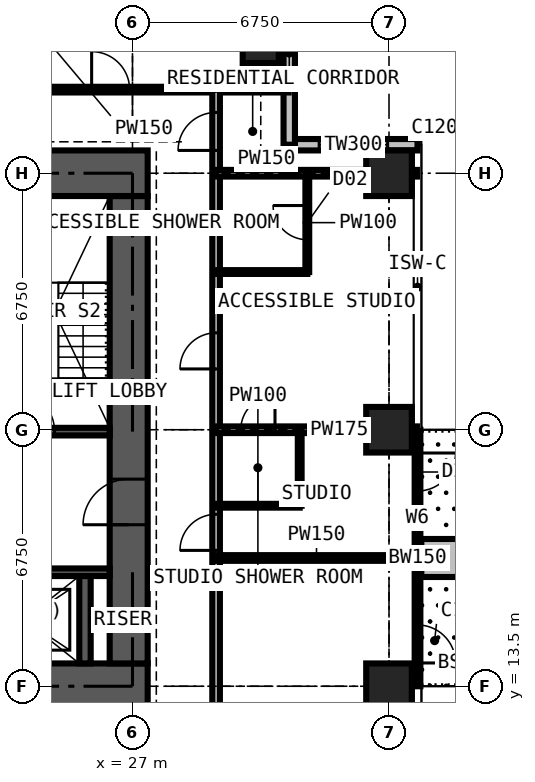
"""IFC4 building model, lengths in metres.
Left out: names, types, materials, properties, quantities, classifications, styles, units other than length and angle.
Written with IfcOpenShell. Run it as: python <this file> out.ifc"""

import sys

from ifc_helpers import new_model, si_unit, direction, frame, frame_2d, origin, origin_2d, place, context, subcontext, project, spatial, rectangle, extrude, element, fill, save


model = new_model("IFC4")
c1 = context("Model", 3, precision=1e-05, world=origin(), true_north=direction((0.0, 1.0)))
c2 = subcontext(c1, "Body", "Model", "MODEL_VIEW")
j1 = project(units=[si_unit("LENGTHUNIT", "METRE"), si_unit("PLANEANGLEUNIT", "RADIAN")], contexts=[c1])
p1 = place(None, origin())
s1 = spatial("IfcSite", under=j1, at=p1, CompositionType="ELEMENT")
p2 = place(p1, origin())
s2 = spatial("IfcBuilding", under=s1, at=p2, CompositionType="ELEMENT")
p3 = place(p2, frame((0.0, 0.0, 185.4)))
s3 = spatial("IfcBuildingStorey", under=s2, at=p3, CompositionType="ELEMENT", Elevation=185.4)
p4 = place(p3, frame((30.375, 30.375, 0.0), z_axis=(0.0, 0.0, 1.0), x_axis=(1.0, 0.0, 0.0)))
e1 = element("IfcColumn", 1, at=p4, inside=s3, PredefinedType="COLUMN", context=c2, shape_type="SweptSolid", body=[
    extrude(rectangle(XDim=0.95, YDim=0.95, at=origin_2d()), origin(), (0.0, 0.0, 1.0), 3.6),
])
for number, where, z_axis, x_axis in (
    (2, (33.75, 13.5, 0.0), (0.0, 0.0, 1.0), (1.0, 0.0, 0.0)),
    (3, (33.75, 20.25, 0.0), (0.0, 0.0, 1.0), (1.0, 0.0, 0.0)),
    (4, (33.75, 27.0, 0.0), (0.0, 0.0, 1.0), (1.0, 0.0, 0.0)),
):
    element("IfcColumn", number, at=place(p3, frame(where, z_axis=z_axis, x_axis=x_axis)), inside=s3, PredefinedType="COLUMN", context=c2, shape_type="SweptSolid", body=[
        extrude(rectangle(XDim=1.2, YDim=1.2, at=origin_2d()), origin(), (0.0, 0.0, 1.0), 3.6),
    ])
p5 = place(p3, frame((13.1, 13.5, 0.0), z_axis=(0.0, 0.0, 1.0), x_axis=(1.0, 0.0, 0.0)))
e5 = element("IfcWall", 5, at=p5, inside=s3, PredefinedType="SHEAR", context=c2, shape_type="SweptSolid", body=[
    extrude(rectangle(XDim=14.3, YDim=1.2, at=frame_2d((7.15, 0.0))), origin(), (0.0, 0.0, 1.0), 3.6),
])
p6 = place(p3, frame((26.9, 14.1, 0.0), z_axis=(0.0, 0.0, 1.0), x_axis=(0.0, 1.0, 0.0)))
e6 = element("IfcWall", 6, at=p6, inside=s3, PredefinedType="SHEAR", context=c2, shape_type="SweptSolid", body=[
    extrude(rectangle(XDim=12.3, YDim=1.0, at=frame_2d((6.15, 0.0))), origin(), (0.0, 0.0, 1.0), 3.6),
])
p7 = place(p6, frame((3.65, 0.0, 0.0)))
e7 = element("IfcOpeningElement", 7, at=p7, cuts=e6, PredefinedType="OPENING", context=c2, shape_type="SweptSolid", body=[
    extrude(rectangle(XDim=1.2, YDim=2.2, at=frame_2d((0.6, 1.1))), frame((0.0, 0.51, 0.0), z_axis=(0.0, -1.0, 0.0), x_axis=(1.0, 0.0, 0.0)), (0.0, 0.0, 1.0), 1.02),
])
p8 = place(p3, frame((27.4, 27.0, 0.0), z_axis=(0.0, 0.0, 1.0), x_axis=(-1.0, 0.0, 0.0)))
e8 = element("IfcWall", 8, at=p8, inside=s3, PredefinedType="SHEAR", context=c2, shape_type="SweptSolid", body=[
    extrude(rectangle(XDim=14.3, YDim=1.2, at=frame_2d((7.15, 0.0))), origin(), (0.0, 0.0, 1.0), 3.6),
])
p9 = place(p8, frame((4.55, 0.0, 0.0)))
e9 = element("IfcOpeningElement", 9, at=p9, cuts=e8, PredefinedType="OPENING", context=c2, shape_type="SweptSolid", body=[
    extrude(rectangle(XDim=0.9, YDim=2.2, at=frame_2d((0.45, 1.1))), frame((0.0, 0.61, 0.0), z_axis=(0.0, -1.0, 0.0), x_axis=(1.0, 0.0, 0.0)), (0.0, 0.0, 1.0), 1.22),
])
p10 = place(p8, frame((7.525, 0.0, 0.0)))
e10 = element("IfcOpeningElement", 10, at=p10, cuts=e8, PredefinedType="OPENING", context=c2, shape_type="SweptSolid", body=[
    extrude(rectangle(XDim=1.0, YDim=2.2, at=frame_2d((0.5, 1.1))), frame((0.0, 0.61, 0.0), z_axis=(0.0, -1.0, 0.0), x_axis=(1.0, 0.0, 0.0)), (0.0, 0.0, 1.0), 1.22),
])
p11 = place(p3, frame((34.5, 20.25, 0.0), z_axis=(0.0, 0.0, 1.0), x_axis=(0.0, -1.0, 0.0)))
e11 = element("IfcWall", 11, at=p11, inside=s3, PredefinedType="SOLIDWALL", context=c2, shape_type="SweptSolid", body=[
    extrude(rectangle(XDim=6.75, YDim=0.15, at=frame_2d((3.375, 0.0))), origin(), (0.0, 0.0, 1.0), 3.375),
])
p12 = place(p11, frame((0.613, 0.0, 0.0)))
e12 = element("IfcOpeningElement", 12, at=p12, cuts=e11, PredefinedType="OPENING", context=c2, shape_type="SweptSolid", body=[
    extrude(rectangle(XDim=1.0, YDim=2.2, at=frame_2d((0.5, 1.1))), frame((0.0, 0.085, 0.0), z_axis=(0.0, -1.0, 0.0), x_axis=(1.0, 0.0, 0.0)), (0.0, 0.0, 1.0), 0.17),
])
p13 = place(p11, frame((1.725, 0.0, 0.9)))
e13 = element("IfcOpeningElement", 13, at=p13, cuts=e11, PredefinedType="OPENING", context=c2, shape_type="SweptSolid", body=[
    extrude(rectangle(XDim=1.2, YDim=1.8, at=frame_2d((0.6, 0.9))), frame((0.0, 0.085, 0.0), z_axis=(0.0, -1.0, 0.0), x_axis=(1.0, 0.0, 0.0)), (0.0, 0.0, 1.0), 0.17),
])
p14 = place(p11, frame((5.137, 0.0, 0.0)))
e14 = element("IfcOpeningElement", 14, at=p14, cuts=e11, PredefinedType="OPENING", context=c2, shape_type="SweptSolid", body=[
    extrude(rectangle(XDim=1.0, YDim=2.2, at=frame_2d((0.5, 1.1))), frame((0.0, 0.085, 0.0), z_axis=(0.0, -1.0, 0.0), x_axis=(1.0, 0.0, 0.0)), (0.0, 0.0, 1.0), 0.17),
])
p15 = place(p11, frame((3.825, 0.0, 0.9)))
e15 = element("IfcOpeningElement", 15, at=p15, cuts=e11, PredefinedType="OPENING", context=c2, shape_type="SweptSolid", body=[
    extrude(rectangle(XDim=1.2, YDim=1.8, at=frame_2d((0.6, 0.9))), frame((0.0, 0.085, 0.0), z_axis=(0.0, -1.0, 0.0), x_axis=(1.0, 0.0, 0.0)), (0.0, 0.0, 1.0), 0.17),
])
p16 = place(p3, frame((34.5, 27.75, 0.0), z_axis=(0.0, 0.0, 1.0), x_axis=(-1.0, 0.0, 0.0)))
e16 = element("IfcWall", 16, at=p16, inside=s3, PredefinedType="SOLIDWALL", context=c2, shape_type="SweptSolid", body=[
    extrude(rectangle(XDim=3.375, YDim=0.3, at=frame_2d((1.688, 0.0))), origin(), (0.0, 0.0, 1.0), 3.375),
])
p17 = place(p16, frame((0.788, 0.0, 0.6)))
e17 = element("IfcOpeningElement", 17, at=p17, cuts=e16, PredefinedType="OPENING", context=c2, shape_type="SweptSolid", body=[
    extrude(rectangle(XDim=1.8, YDim=2.1, at=frame_2d((0.9, 1.05))), frame((0.0, 0.16, 0.0), z_axis=(0.0, -1.0, 0.0), x_axis=(1.0, 0.0, 0.0)), (0.0, 0.0, 1.0), 0.32),
])
p18 = place(p3, frame((31.125, 27.75, 0.0), z_axis=(0.0, 0.0, 1.0), x_axis=(0.0, 1.0, 0.0)))
e18 = element("IfcWall", 18, at=p18, inside=s3, PredefinedType="SOLIDWALL", context=c2, shape_type="SweptSolid", body=[
    extrude(rectangle(XDim=3.375, YDim=0.3, at=frame_2d((1.688, 0.0))), origin(), (0.0, 0.0, 1.0), 3.375),
])
p19 = place(p18, frame((1.663, 0.0, 0.9)))
e19 = element("IfcOpeningElement", 19, at=p19, cuts=e18, PredefinedType="OPENING", context=c2, shape_type="SweptSolid", body=[
    extrude(rectangle(XDim=1.5, YDim=1.8, at=frame_2d((0.75, 0.9))), frame((0.0, 0.16, 0.0), z_axis=(0.0, -1.0, 0.0), x_axis=(1.0, 0.0, 0.0)), (0.0, 0.0, 1.0), 0.32),
])
p20 = place(p3, frame((34.6, 16.875, 0.0), z_axis=(0.0, 0.0, 1.0), x_axis=(1.0, 0.0, 0.0)))
e20 = element("IfcWall", 20, at=p20, inside=s3, PredefinedType="USERDEFINED", context=c2, shape_type="SweptSolid", body=[
    extrude(rectangle(XDim=2.2, YDim=1.0, at=frame_2d((1.1, 0.0))), origin(), (0.0, 0.0, 1.0), 0.9),
])
p21 = place(p3, frame((14.1, 16.5, 0.0), z_axis=(0.0, 0.0, 1.0), x_axis=(1.0, 0.0, 0.0)))
e21 = element("IfcWall", 21, at=p21, inside=s3, PredefinedType="SHEAR", context=c2, shape_type="SweptSolid", body=[
    extrude(rectangle(XDim=12.3, YDim=0.2, at=frame_2d((6.15, 0.0))), origin(), (0.0, 0.0, 1.0), 3.6),
])
p22 = place(p21, frame((0.9, 0.0, 0.0)))
e22 = element("IfcOpeningElement", 22, at=p22, cuts=e21, PredefinedType="OPENING", context=c2, shape_type="SweptSolid", body=[
    extrude(rectangle(XDim=1.1, YDim=2.2, at=frame_2d((0.55, 1.1))), frame((0.0, 0.11, 0.0), z_axis=(0.0, -1.0, 0.0), x_axis=(1.0, 0.0, 0.0)), (0.0, 0.0, 1.0), 0.22),
])
p23 = place(p21, frame((4.31, 0.0, 0.0)))
e23 = element("IfcOpeningElement", 23, at=p23, cuts=e21, PredefinedType="OPENING", context=c2, shape_type="SweptSolid", body=[
    extrude(rectangle(XDim=1.1, YDim=2.2, at=frame_2d((0.55, 1.1))), frame((0.0, 0.11, 0.0), z_axis=(0.0, -1.0, 0.0), x_axis=(1.0, 0.0, 0.0)), (0.0, 0.0, 1.0), 0.22),
])
p24 = place(p21, frame((6.45, 0.0, 0.0)))
e24 = element("IfcOpeningElement", 24, at=p24, cuts=e21, PredefinedType="OPENING", context=c2, shape_type="SweptSolid", body=[
    extrude(rectangle(XDim=1.1, YDim=2.2, at=frame_2d((0.55, 1.1))), frame((0.0, 0.11, 0.0), z_axis=(0.0, -1.0, 0.0), x_axis=(1.0, 0.0, 0.0)), (0.0, 0.0, 1.0), 0.22),
])
p25 = place(p21, frame((9.5, 0.0, 0.0)))
e25 = element("IfcOpeningElement", 25, at=p25, cuts=e21, PredefinedType="OPENING", context=c2, shape_type="SweptSolid", body=[
    extrude(rectangle(XDim=1.1, YDim=2.2, at=frame_2d((0.55, 1.1))), frame((0.0, 0.11, 0.0), z_axis=(0.0, -1.0, 0.0), x_axis=(1.0, 0.0, 0.0)), (0.0, 0.0, 1.0), 0.22),
])
p26 = place(p3, frame((14.1, 20.2, 0.0), z_axis=(0.0, 0.0, 1.0), x_axis=(1.0, 0.0, 0.0)))
e26 = element("IfcWall", 26, at=p26, inside=s3, PredefinedType="SHEAR", context=c2, shape_type="SweptSolid", body=[
    extrude(rectangle(XDim=12.3, YDim=0.2, at=frame_2d((6.15, 0.0))), origin(), (0.0, 0.0, 1.0), 3.6),
])
p27 = place(p26, frame((4.56, 0.0, 0.0)))
e27 = element("IfcOpeningElement", 27, at=p27, cuts=e26, PredefinedType="OPENING", context=c2, shape_type="SweptSolid", body=[
    extrude(rectangle(XDim=1.1, YDim=2.2, at=frame_2d((0.55, 1.1))), frame((0.0, 0.11, 0.0), z_axis=(0.0, -1.0, 0.0), x_axis=(1.0, 0.0, 0.0)), (0.0, 0.0, 1.0), 0.22),
])
p28 = place(p26, frame((6.7, 0.0, 0.0)))
e28 = element("IfcOpeningElement", 28, at=p28, cuts=e26, PredefinedType="OPENING", context=c2, shape_type="SweptSolid", body=[
    extrude(rectangle(XDim=1.1, YDim=2.2, at=frame_2d((0.55, 1.1))), frame((0.0, 0.11, 0.0), z_axis=(0.0, -1.0, 0.0), x_axis=(1.0, 0.0, 0.0)), (0.0, 0.0, 1.0), 0.22),
])
p29 = place(p26, frame((0.35, 0.0, 0.0)))
e29 = element("IfcOpeningElement", 29, at=p29, cuts=e26, PredefinedType="OPENING", context=c2, shape_type="SweptSolid", body=[
    extrude(rectangle(XDim=1.1, YDim=2.2, at=frame_2d((0.55, 1.1))), frame((0.0, 0.11, 0.0), z_axis=(0.0, -1.0, 0.0), x_axis=(1.0, 0.0, 0.0)), (0.0, 0.0, 1.0), 0.22),
])
p30 = place(p26, frame((9.75, 0.0, 0.0)))
e30 = element("IfcOpeningElement", 30, at=p30, cuts=e26, PredefinedType="OPENING", context=c2, shape_type="SweptSolid", body=[
    extrude(rectangle(XDim=1.1, YDim=2.2, at=frame_2d((0.55, 1.1))), frame((0.0, 0.11, 0.0), z_axis=(0.0, -1.0, 0.0), x_axis=(1.0, 0.0, 0.0)), (0.0, 0.0, 1.0), 0.22),
])
p31 = place(p3, frame((25.75, 14.1, 0.0), z_axis=(0.0, 0.0, 1.0), x_axis=(0.0, 1.0, 0.0)))
e31 = element("IfcWall", 31, at=p31, inside=s3, PredefinedType="SHEAR", context=c2, shape_type="SweptSolid", body=[
    extrude(rectangle(XDim=2.3, YDim=0.3, at=frame_2d((1.15, 0.0))), origin(), (0.0, 0.0, 1.0), 3.6),
])
p32 = place(p3, frame((11.3, 29.2, 0.0), z_axis=(0.0, 0.0, 1.0), x_axis=(1.0, 0.0, 0.0)))
e32 = element("IfcWall", 32, at=p32, inside=s3, PredefinedType="PARTITIONING", context=c2, shape_type="SweptSolid", body=[
    extrude(rectangle(XDim=19.809, YDim=0.15, at=frame_2d((9.904, 0.0))), origin(), (0.0, 0.0, 1.0), 3.375),
])
p33 = place(p32, frame((14.625, 0.0, 0.0)))
e33 = element("IfcOpeningElement", 33, at=p33, cuts=e32, PredefinedType="OPENING", context=c2, shape_type="SweptSolid", body=[
    extrude(rectangle(XDim=1.0, YDim=2.2, at=frame_2d((0.5, 1.1))), frame((0.0, 0.085, 0.0), z_axis=(0.0, -1.0, 0.0), x_axis=(1.0, 0.0, 0.0)), (0.0, 0.0, 1.0), 0.17),
])
p34 = place(p32, frame((5.825, 0.0, 0.0)))
e34 = element("IfcOpeningElement", 34, at=p34, cuts=e32, PredefinedType="OPENING", context=c2, shape_type="SweptSolid", body=[
    extrude(rectangle(XDim=0.95, YDim=2.2, at=frame_2d((0.475, 1.1))), frame((0.0, 0.085, 0.0), z_axis=(0.0, -1.0, 0.0), x_axis=(1.0, 0.0, 0.0)), (0.0, 0.0, 1.0), 0.17),
])
p35 = place(p32, frame((9.2, 0.0, 0.0)))
e35 = element("IfcOpeningElement", 35, at=p35, cuts=e32, PredefinedType="OPENING", context=c2, shape_type="SweptSolid", body=[
    extrude(rectangle(XDim=0.95, YDim=2.2, at=frame_2d((0.475, 1.1))), frame((0.0, 0.085, 0.0), z_axis=(0.0, -1.0, 0.0), x_axis=(1.0, 0.0, 0.0)), (0.0, 0.0, 1.0), 0.17),
])
p36 = place(p32, frame((0.6, 0.0, 0.0)))
e36 = element("IfcOpeningElement", 36, at=p36, cuts=e32, PredefinedType="OPENING", context=c2, shape_type="SweptSolid", body=[
    extrude(rectangle(XDim=1.0, YDim=2.2, at=frame_2d((0.5, 1.1))), frame((0.0, 0.085, 0.0), z_axis=(0.0, -1.0, 0.0), x_axis=(1.0, 0.0, 0.0)), (0.0, 0.0, 1.0), 0.17),
])
p37 = place(p3, frame((29.2, 11.3, 0.0), z_axis=(0.0, 0.0, 1.0), x_axis=(0.0, 1.0, 0.0)))
e37 = element("IfcWall", 37, at=p37, inside=s3, PredefinedType="PARTITIONING", context=c2, shape_type="SweptSolid", body=[
    extrude(rectangle(XDim=17.9, YDim=0.2, at=frame_2d((8.95, 0.0))), origin(), (0.0, 0.0, 1.0), 3.375),
])
p38 = place(p37, frame((10.55, 0.0, 0.0)))
e38 = element("IfcOpeningElement", 38, at=p38, cuts=e37, PredefinedType="OPENING", context=c2, shape_type="SweptSolid", body=[
    extrude(rectangle(XDim=0.95, YDim=2.2, at=frame_2d((0.475, 1.1))), frame((0.0, 0.11, 0.0), z_axis=(0.0, -1.0, 0.0), x_axis=(1.0, 0.0, 0.0)), (0.0, 0.0, 1.0), 0.22),
])
p39 = place(p37, frame((5.775, 0.0, 0.0)))
e39 = element("IfcOpeningElement", 39, at=p39, cuts=e37, PredefinedType="OPENING", context=c2, shape_type="SweptSolid", body=[
    extrude(rectangle(XDim=0.95, YDim=2.2, at=frame_2d((0.475, 1.1))), frame((0.0, 0.11, 0.0), z_axis=(0.0, -1.0, 0.0), x_axis=(1.0, 0.0, 0.0)), (0.0, 0.0, 1.0), 0.22),
])
p40 = place(p37, frame((16.3, 0.0, 0.0)))
e40 = element("IfcOpeningElement", 40, at=p40, cuts=e37, PredefinedType="OPENING", context=c2, shape_type="SweptSolid", body=[
    extrude(rectangle(XDim=1.0, YDim=2.2, at=frame_2d((0.5, 1.1))), frame((0.0, 0.11, 0.0), z_axis=(0.0, -1.0, 0.0), x_axis=(1.0, 0.0, 0.0)), (0.0, 0.0, 1.0), 0.22),
])
p41 = place(p3, frame((29.2, 16.875, 0.0), z_axis=(0.0, 0.0, 1.0), x_axis=(1.0, 0.0, 0.0)))
e41 = element("IfcWall", 41, at=p41, inside=s3, PredefinedType="PARTITIONING", context=c2, shape_type="SweptSolid", body=[
    extrude(rectangle(XDim=5.284, YDim=0.15, at=frame_2d((2.642, 0.0))), origin(), (0.0, 0.0, 1.0), 3.375),
])
p42 = place(p3, frame((29.2, 18.25, 0.0), z_axis=(0.0, 0.0, 1.0), x_axis=(1.0, 0.0, 0.0)))
e42 = element("IfcWall", 42, at=p42, inside=s3, PredefinedType="PARTITIONING", context=c2, shape_type="SweptSolid", body=[
    extrude(rectangle(XDim=2.2, YDim=0.1, at=frame_2d((1.1, 0.0))), origin(), (0.0, 0.0, 1.0), 3.375),
])
p43 = place(p3, frame((29.2, 20.25, 0.0), z_axis=(0.0, 0.0, 1.0), x_axis=(1.0, 0.0, 0.0)))
e43 = element("IfcWall", 43, at=p43, inside=s3, PredefinedType="PARTITIONING", context=c2, shape_type="SweptSolid", body=[
    extrude(rectangle(XDim=5.284, YDim=0.175, at=frame_2d((2.642, 0.0))), origin(), (0.0, 0.0, 1.0), 2.806),
])
p44 = place(p43, frame((0.65, 0.0, 0.0)))
e44 = element("IfcOpeningElement", 44, at=p44, cuts=e43, PredefinedType="OPENING", context=c2, shape_type="SweptSolid", body=[
    extrude(rectangle(XDim=0.9, YDim=2.2, at=frame_2d((0.45, 1.1))), frame((0.0, 0.097, 0.0), z_axis=(0.0, -1.0, 0.0), x_axis=(1.0, 0.0, 0.0)), (0.0, 0.0, 1.0), 0.195),
])
p45 = place(p3, frame((29.2, 24.4, 0.0), z_axis=(0.0, 0.0, 1.0), x_axis=(1.0, 0.0, 0.0)))
e45 = element("IfcWall", 45, at=p45, inside=s3, PredefinedType="PARTITIONING", context=c2, shape_type="SweptSolid", body=[
    extrude(rectangle(XDim=2.4, YDim=0.1, at=frame_2d((1.2, 0.0))), origin(), (0.0, 0.0, 1.0), 3.375),
])
p46 = place(p3, frame((29.2, 27.0, 0.0), z_axis=(0.0, 0.0, 1.0), x_axis=(1.0, 0.0, 0.0)))
e46 = element("IfcWall", 46, at=p46, inside=s3, PredefinedType="PARTITIONING", context=c2, shape_type="SweptSolid", body=[
    extrude(rectangle(XDim=5.284, YDim=0.175, at=frame_2d((2.642, 0.0))), origin(), (0.0, 0.0, 1.0), 2.806),
])
p47 = place(p3, frame((31.125, 27.0, 0.0), z_axis=(0.0, 0.0, 1.0), x_axis=(0.0, 1.0, 0.0)))
e47 = element("IfcWall", 47, at=p47, inside=s3, PredefinedType="PARTITIONING", context=c2, shape_type="SweptSolid", body=[
    extrude(rectangle(XDim=0.734, YDim=0.15, at=frame_2d((0.367, 0.0))), origin(), (0.0, 0.0, 1.0), 3.375),
])
p48 = place(p3, frame((31.4, 18.25, 0.0), z_axis=(0.0, 0.0, 1.0), x_axis=(0.0, 1.0, 0.0)))
e48 = element("IfcWall", 48, at=p48, inside=s3, PredefinedType="PARTITIONING", context=c2, shape_type="SweptSolid", body=[
    extrude(rectangle(XDim=2.0, YDim=0.1, at=frame_2d((1.0, 0.0))), origin(), (0.0, 0.0, 1.0), 3.375),
])
p49 = place(p3, frame((31.6, 24.4, 0.0), z_axis=(0.0, 0.0, 1.0), x_axis=(0.0, 1.0, 0.0)))
e49 = element("IfcWall", 49, at=p49, inside=s3, PredefinedType="PARTITIONING", context=c2, shape_type="SweptSolid", body=[
    extrude(rectangle(XDim=2.6, YDim=0.1, at=frame_2d((1.3, 0.0))), origin(), (0.0, 0.0, 1.0), 3.375),
])
p50 = place(p49, frame((0.85, 0.0, 0.0)))
e50 = element("IfcOpeningElement", 50, at=p50, cuts=e49, PredefinedType="OPENING", context=c2, shape_type="SweptSolid", body=[
    extrude(rectangle(XDim=0.9, YDim=2.2, at=frame_2d((0.45, 1.1))), frame((0.0, 0.06, 0.0), z_axis=(0.0, -1.0, 0.0), x_axis=(1.0, 0.0, 0.0)), (0.0, 0.0, 1.0), 0.12),
])
p51 = place(p12, origin())
e51 = element("IfcDoor", 51, at=p51, inside=s3, OperationType="SINGLE_SWING_LEFT", PredefinedType="DOOR", context=c2, shape_type="SweptSolid", body=[
    extrude(rectangle(XDim=1.0, YDim=2.2, at=frame_2d((0.5, 1.1))), frame((0.0, 0.025, 0.0), z_axis=(0.0, -1.0, 0.0), x_axis=(1.0, 0.0, 0.0)), (0.0, 0.0, 1.0), 0.05),
])
fill(e12, e51)
p52 = place(p13, origin())
e52 = element("IfcWindow", 52, at=p52, inside=s3, PartitioningType="SINGLE_PANEL", PredefinedType="WINDOW", context=c2, shape_type="SweptSolid", body=[
    extrude(rectangle(XDim=1.2, YDim=1.8, at=frame_2d((0.6, 0.9))), frame((0.0, 0.03, 0.0), z_axis=(0.0, -1.0, 0.0), x_axis=(1.0, 0.0, 0.0)), (0.0, 0.0, 1.0), 0.06),
])
fill(e13, e52)
p53 = place(p14, origin())
e53 = element("IfcDoor", 53, at=p53, inside=s3, OperationType="SINGLE_SWING_RIGHT", PredefinedType="DOOR", context=c2, shape_type="SweptSolid", body=[
    extrude(rectangle(XDim=1.0, YDim=2.2, at=frame_2d((0.5, 1.1))), frame((0.0, 0.025, 0.0), z_axis=(0.0, -1.0, 0.0), x_axis=(1.0, 0.0, 0.0)), (0.0, 0.0, 1.0), 0.05),
])
fill(e14, e53)
p54 = place(p15, origin())
e54 = element("IfcWindow", 54, at=p54, inside=s3, PartitioningType="SINGLE_PANEL", PredefinedType="WINDOW", context=c2, shape_type="SweptSolid", body=[
    extrude(rectangle(XDim=1.2, YDim=1.8, at=frame_2d((0.6, 0.9))), frame((0.0, 0.03, 0.0), z_axis=(0.0, -1.0, 0.0), x_axis=(1.0, 0.0, 0.0)), (0.0, 0.0, 1.0), 0.06),
])
fill(e15, e54)
p55 = place(p17, origin())
e55 = element("IfcWindow", 55, at=p55, inside=s3, PartitioningType="SINGLE_PANEL", PredefinedType="WINDOW", context=c2, shape_type="SweptSolid", body=[
    extrude(rectangle(XDim=1.8, YDim=2.1, at=frame_2d((0.9, 1.05))), frame((0.0, 0.03, 0.0), z_axis=(0.0, -1.0, 0.0), x_axis=(1.0, 0.0, 0.0)), (0.0, 0.0, 1.0), 0.06),
])
fill(e17, e55)
p56 = place(p19, origin())
e56 = element("IfcWindow", 56, at=p56, inside=s3, PartitioningType="SINGLE_PANEL", PredefinedType="WINDOW", context=c2, shape_type="SweptSolid", body=[
    extrude(rectangle(XDim=1.5, YDim=1.8, at=frame_2d((0.75, 0.9))), frame((0.0, 0.03, 0.0), z_axis=(0.0, -1.0, 0.0), x_axis=(1.0, 0.0, 0.0)), (0.0, 0.0, 1.0), 0.06),
])
fill(e19, e56)
p57 = place(p7, origin())
e57 = element("IfcDoor", 57, at=p57, inside=s3, OperationType="DOUBLE_DOOR_SINGLE_SWING", PredefinedType="DOOR", context=c2, shape_type="SweptSolid", body=[
    extrude(rectangle(XDim=1.2, YDim=2.2, at=frame_2d((0.6, 1.1))), frame((0.0, 0.025, 0.0), z_axis=(0.0, -1.0, 0.0), x_axis=(1.0, 0.0, 0.0)), (0.0, 0.0, 1.0), 0.05),
])
fill(e7, e57)
p58 = place(p30, origin())
e58 = element("IfcDoor", 58, at=p58, inside=s3, OperationType="SINGLE_SWING_LEFT", PredefinedType="DOOR", context=c2, shape_type="SweptSolid", body=[
    extrude(rectangle(XDim=1.1, YDim=2.2, at=frame_2d((0.55, 1.1))), frame((0.0, 0.025, 0.0), z_axis=(0.0, -1.0, 0.0), x_axis=(1.0, 0.0, 0.0)), (0.0, 0.0, 1.0), 0.05),
])
fill(e30, e58)
p59 = place(p38, origin())
e59 = element("IfcDoor", 59, at=p59, inside=s3, OperationType="SINGLE_SWING_LEFT", PredefinedType="DOOR", context=c2, shape_type="SweptSolid", body=[
    extrude(rectangle(XDim=0.95, YDim=2.2, at=frame_2d((0.475, 1.1))), frame((0.0, 0.025, 0.0), z_axis=(0.0, -1.0, 0.0), x_axis=(1.0, 0.0, 0.0)), (0.0, 0.0, 1.0), 0.05),
])
fill(e38, e59)
p60 = place(p50, origin())
e60 = element("IfcDoor", 60, at=p60, inside=s3, OperationType="SINGLE_SWING_RIGHT", PredefinedType="DOOR", context=c2, shape_type="SweptSolid", body=[
    extrude(rectangle(XDim=0.9, YDim=2.2, at=frame_2d((0.45, 1.1))), frame((0.0, 0.025, 0.0), z_axis=(0.0, -1.0, 0.0), x_axis=(1.0, 0.0, 0.0)), (0.0, 0.0, 1.0), 0.05),
])
fill(e50, e60)
p61 = place(p39, origin())
e61 = element("IfcDoor", 61, at=p61, inside=s3, OperationType="SINGLE_SWING_LEFT", PredefinedType="DOOR", context=c2, shape_type="SweptSolid", body=[
    extrude(rectangle(XDim=0.95, YDim=2.2, at=frame_2d((0.475, 1.1))), frame((0.0, 0.025, 0.0), z_axis=(0.0, -1.0, 0.0), x_axis=(1.0, 0.0, 0.0)), (0.0, 0.0, 1.0), 0.05),
])
fill(e39, e61)
p62 = place(p44, origin())
e62 = element("IfcDoor", 62, at=p62, inside=s3, OperationType="SINGLE_SWING_RIGHT", PredefinedType="DOOR", context=c2, shape_type="SweptSolid", body=[
    extrude(rectangle(XDim=0.9, YDim=2.2, at=frame_2d((0.45, 1.1))), frame((0.0, 0.025, 0.0), z_axis=(0.0, -1.0, 0.0), x_axis=(1.0, 0.0, 0.0)), (0.0, 0.0, 1.0), 0.05),
])
fill(e44, e62)
p63 = place(p40, origin())
e63 = element("IfcDoor", 63, at=p63, inside=s3, OperationType="SINGLE_SWING_LEFT", PredefinedType="DOOR", context=c2, shape_type="SweptSolid", body=[
    extrude(rectangle(XDim=1.0, YDim=2.2, at=frame_2d((0.5, 1.1))), frame((0.0, 0.025, 0.0), z_axis=(0.0, -1.0, 0.0), x_axis=(1.0, 0.0, 0.0)), (0.0, 0.0, 1.0), 0.05),
])
fill(e40, e63)
p64 = place(p33, origin())
e64 = element("IfcDoor", 64, at=p64, inside=s3, OperationType="SINGLE_SWING_LEFT", PredefinedType="DOOR", context=c2, shape_type="SweptSolid", body=[
    extrude(rectangle(XDim=1.0, YDim=2.2, at=frame_2d((0.5, 1.1))), frame((0.0, 0.025, 0.0), z_axis=(0.0, -1.0, 0.0), x_axis=(1.0, 0.0, 0.0)), (0.0, 0.0, 1.0), 0.05),
])
fill(e33, e64)
save(model, sys.argv[1])
